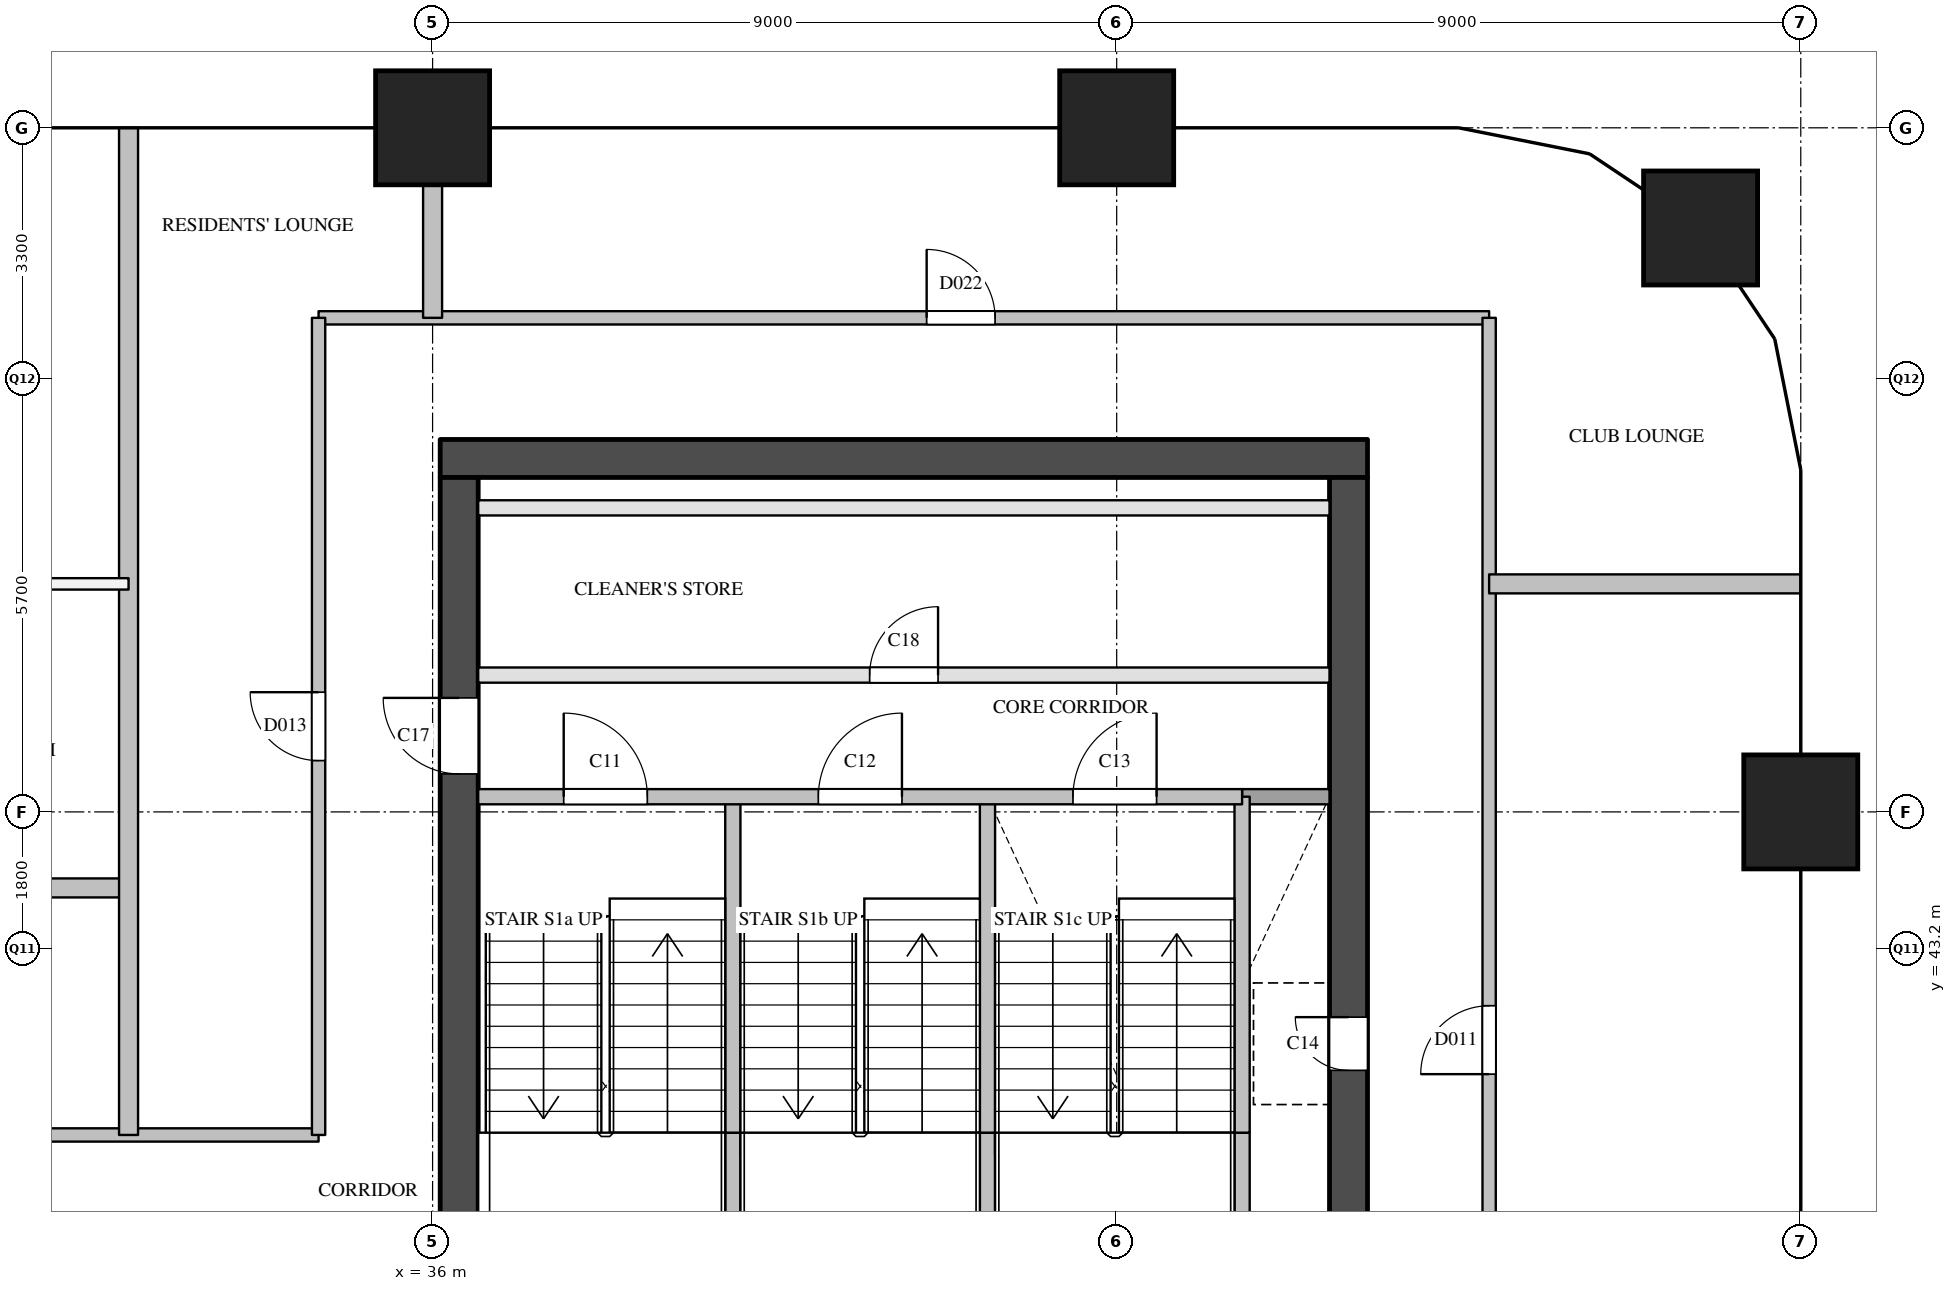
"""IFC4 building model, lengths in metres.
Left out: names, types, materials, properties, quantities, classifications, styles, units other than length and angle.
Written with IfcOpenShell. Run it as: python <this file> out.ifc"""

import sys

from ifc_helpers import new_model, si_unit, direction, frame, frame_2d, origin, origin_2d, place, context, subcontext, project, spatial, rectangle, extrude, element, fill, save


model = new_model("IFC4")
c1 = context("Model", 3, precision=1e-05, world=origin(), true_north=direction((0.0, 1.0)))
c2 = subcontext(c1, "Body", "Model", "MODEL_VIEW")
j1 = project(units=[si_unit("LENGTHUNIT", "METRE"), si_unit("PLANEANGLEUNIT", "RADIAN")], contexts=[c1])
p1 = place(None, origin())
s1 = spatial("IfcSite", under=j1, at=p1, CompositionType="ELEMENT")
p2 = place(p1, origin())
s2 = spatial("IfcBuilding", under=s1, at=p2, CompositionType="ELEMENT")
p3 = place(p2, frame((0.0, 0.0, 173.9)))
s3 = spatial("IfcBuildingStorey", under=s2, at=p3, CompositionType="ELEMENT", Elevation=173.9)
for number, where, z_axis, x_axis in (
    (1, (36.0, 54.0, 0.0), (0.0, 0.0, 1.0), (1.0, 0.0, 0.0)),
    (2, (45.0, 54.0, 0.0), (0.0, 0.0, 1.0), (1.0, 0.0, 0.0)),
    (3, (54.0, 45.0, 0.0), (0.0, 0.0, 1.0), (1.0, 0.0, 0.0)),
    (4, (52.682, 52.682, 0.0), (0.0, 0.0, 1.0), (1.0, 0.0, 0.0)),
):
    element("IfcColumn", number, at=place(p3, frame(where, z_axis=z_axis, x_axis=x_axis)), inside=s3, PredefinedType="COLUMN", context=c2, shape_type="SweptSolid", body=[
        extrude(rectangle(XDim=1.5, YDim=1.5, at=origin_2d()), origin(), (0.0, 0.0, 1.0), 3.9),
    ])
p4 = place(p3, frame((36.1, 49.65, 0.0), z_axis=(0.0, 0.0, 1.0), x_axis=(1.0, 0.0, 0.0)))
e5 = element("IfcWall", 5, at=p4, inside=s3, PredefinedType="SHEAR", context=c2, shape_type="SweptSolid", body=[
    extrude(rectangle(XDim=12.2, YDim=0.5, at=frame_2d((6.1, 0.0))), origin(), (0.0, 0.0, 1.0), 3.6),
])
p5 = place(p3, frame((36.35, 29.1, 0.0), z_axis=(0.0, 0.0, 1.0), x_axis=(0.0, 1.0, 0.0)))
e6 = element("IfcWall", 6, at=p5, inside=s3, PredefinedType="SHEAR", context=c2, shape_type="SweptSolid", body=[
    extrude(rectangle(XDim=20.3, YDim=0.5, at=frame_2d((10.15, 0.0))), origin(), (0.0, 0.0, 1.0), 3.6),
])
p6 = place(p5, frame((3.6, 0.0, 0.0)))
e7 = element("IfcOpeningElement", 7, at=p6, cuts=e6, PredefinedType="OPENING", context=c2, shape_type="SweptSolid", body=[
    extrude(rectangle(XDim=1.8, YDim=2.1, at=frame_2d((0.9, 1.05))), frame((0.0, 0.26, 0.0), z_axis=(0.0, -1.0, 0.0), x_axis=(1.0, 0.0, 0.0)), (0.0, 0.0, 1.0), 0.52),
])
p7 = place(p5, frame((16.4, 0.0, 0.0)))
e8 = element("IfcOpeningElement", 8, at=p7, cuts=e6, PredefinedType="OPENING", context=c2, shape_type="SweptSolid", body=[
    extrude(rectangle(XDim=1.0, YDim=2.1, at=frame_2d((0.5, 1.05))), frame((0.0, 0.26, 0.0), z_axis=(0.0, -1.0, 0.0), x_axis=(1.0, 0.0, 0.0)), (0.0, 0.0, 1.0), 0.52),
])
p8 = place(p3, frame((48.05, 29.1, 0.0), z_axis=(0.0, 0.0, 1.0), x_axis=(0.0, 1.0, 0.0)))
e9 = element("IfcWall", 9, at=p8, inside=s3, PredefinedType="SHEAR", context=c2, shape_type="SweptSolid", body=[
    extrude(rectangle(XDim=20.3, YDim=0.5, at=frame_2d((10.15, 0.0))), origin(), (0.0, 0.0, 1.0), 3.6),
])
p9 = place(p8, frame((12.5, 0.0, 0.0)))
e10 = element("IfcOpeningElement", 10, at=p9, cuts=e9, PredefinedType="OPENING", context=c2, shape_type="SweptSolid", body=[
    extrude(rectangle(XDim=0.7, YDim=2.1, at=frame_2d((0.35, 1.05))), frame((0.0, 0.26, 0.0), z_axis=(0.0, -1.0, 0.0), x_axis=(1.0, 0.0, 0.0)), (0.0, 0.0, 1.0), 0.52),
])
p10 = place(p8, frame((3.9, 0.0, 0.0)))
e11 = element("IfcOpeningElement", 11, at=p10, cuts=e9, PredefinedType="OPENING", context=c2, shape_type="SweptSolid", body=[
    extrude(rectangle(XDim=1.8, YDim=2.1, at=frame_2d((0.9, 1.05))), frame((0.0, 0.26, 0.0), z_axis=(0.0, -1.0, 0.0), x_axis=(1.0, 0.0, 0.0)), (0.0, 0.0, 1.0), 0.52),
])
p11 = place(p3, frame((39.95, 39.0, 0.0), z_axis=(0.0, 0.0, 1.0), x_axis=(0.0, 1.0, 0.0)))
e12 = element("IfcWall", 12, at=p11, inside=s3, PredefinedType="SOLIDWALL", context=c2, shape_type="SweptSolid", body=[
    extrude(rectangle(XDim=1.78, YDim=0.2, at=frame_2d((0.89, 0.0))), origin(), (0.0, 0.0, 1.0), 3.6),
])
p12 = place(p3, frame((39.95, 40.78, 0.0), z_axis=(0.0, 0.0, 1.0), x_axis=(0.0, 1.0, 0.0)))
e13 = element("IfcWall", 13, at=p12, inside=s3, PredefinedType="SOLIDWALL", context=c2, shape_type="SweptSolid", body=[
    extrude(rectangle(XDim=4.42, YDim=0.2, at=frame_2d((2.21, 0.0))), origin(), (0.0, 0.0, 1.0), 3.6),
])
p13 = place(p3, frame((43.3, 39.0, 0.0), z_axis=(0.0, 0.0, 1.0), x_axis=(0.0, 1.0, 0.0)))
e14 = element("IfcWall", 14, at=p13, inside=s3, PredefinedType="SOLIDWALL", context=c2, shape_type="SweptSolid", body=[
    extrude(rectangle(XDim=1.78, YDim=0.2, at=frame_2d((0.89, 0.0))), origin(), (0.0, 0.0, 1.0), 3.6),
])
p14 = place(p3, frame((43.3, 40.78, 0.0), z_axis=(0.0, 0.0, 1.0), x_axis=(0.0, 1.0, 0.0)))
e15 = element("IfcWall", 15, at=p14, inside=s3, PredefinedType="SOLIDWALL", context=c2, shape_type="SweptSolid", body=[
    extrude(rectangle(XDim=4.42, YDim=0.2, at=frame_2d((2.21, 0.0))), origin(), (0.0, 0.0, 1.0), 3.6),
])
p15 = place(p3, frame((46.65, 39.0, 0.0), z_axis=(0.0, 0.0, 1.0), x_axis=(0.0, 1.0, 0.0)))
e16 = element("IfcWall", 16, at=p15, inside=s3, PredefinedType="SOLIDWALL", context=c2, shape_type="SweptSolid", body=[
    extrude(rectangle(XDim=1.78, YDim=0.2, at=frame_2d((0.89, 0.0))), origin(), (0.0, 0.0, 1.0), 3.6),
])
p16 = place(p3, frame((46.65, 40.78, 0.0), z_axis=(0.0, 0.0, 1.0), x_axis=(0.0, 1.0, 0.0)))
e17 = element("IfcWall", 17, at=p16, inside=s3, PredefinedType="SOLIDWALL", context=c2, shape_type="SweptSolid", body=[
    extrude(rectangle(XDim=4.42, YDim=0.2, at=frame_2d((2.21, 0.0))), origin(), (0.0, 0.0, 1.0), 3.6),
])
p17 = place(p3, frame((46.65, 45.2, 0.0), z_axis=(0.0, 0.0, 1.0), x_axis=(1.0, 0.0, 0.0)))
e18 = element("IfcWall", 18, at=p17, inside=s3, PredefinedType="SOLIDWALL", context=c2, shape_type="SweptSolid", body=[
    extrude(rectangle(XDim=1.15, YDim=0.2, at=frame_2d((0.575, 0.0))), origin(), (0.0, 0.0, 1.0), 3.6),
])
p18 = place(p3, frame((36.6, 45.2, 0.0), z_axis=(0.0, 0.0, 1.0), x_axis=(1.0, 0.0, 0.0)))
e19 = element("IfcWall", 19, at=p18, inside=s3, PredefinedType="SOLIDWALL", context=c2, shape_type="SweptSolid", body=[
    extrude(rectangle(XDim=10.05, YDim=0.2, at=frame_2d((5.025, 0.0))), origin(), (0.0, 0.0, 1.0), 3.6),
])
p19 = place(p18, frame((1.125, 0.0, 0.0)))
e20 = element("IfcOpeningElement", 20, at=p19, cuts=e19, PredefinedType="OPENING", context=c2, shape_type="SweptSolid", body=[
    extrude(rectangle(XDim=1.1, YDim=2.1, at=frame_2d((0.55, 1.05))), frame((0.0, 0.11, 0.0), z_axis=(0.0, -1.0, 0.0), x_axis=(1.0, 0.0, 0.0)), (0.0, 0.0, 1.0), 0.22),
])
p20 = place(p18, frame((4.475, 0.0, 0.0)))
e21 = element("IfcOpeningElement", 21, at=p20, cuts=e19, PredefinedType="OPENING", context=c2, shape_type="SweptSolid", body=[
    extrude(rectangle(XDim=1.1, YDim=2.1, at=frame_2d((0.55, 1.05))), frame((0.0, 0.11, 0.0), z_axis=(0.0, -1.0, 0.0), x_axis=(1.0, 0.0, 0.0)), (0.0, 0.0, 1.0), 0.22),
])
p21 = place(p18, frame((7.825, 0.0, 0.0)))
e22 = element("IfcOpeningElement", 22, at=p21, cuts=e19, PredefinedType="OPENING", context=c2, shape_type="SweptSolid", body=[
    extrude(rectangle(XDim=1.1, YDim=2.1, at=frame_2d((0.55, 1.05))), frame((0.0, 0.11, 0.0), z_axis=(0.0, -1.0, 0.0), x_axis=(1.0, 0.0, 0.0)), (0.0, 0.0, 1.0), 0.22),
])
p22 = place(p3, frame((36.6, 46.8, 0.0), z_axis=(0.0, 0.0, 1.0), x_axis=(1.0, 0.0, 0.0)))
e23 = element("IfcWall", 23, at=p22, inside=s3, PredefinedType="PARTITIONING", context=c2, shape_type="SweptSolid", body=[
    extrude(rectangle(XDim=11.2, YDim=0.2, at=frame_2d((5.6, 0.0))), origin(), (0.0, 0.0, 1.0), 3.6),
])
p23 = place(p22, frame((5.15, 0.0, 0.0)))
e24 = element("IfcOpeningElement", 24, at=p23, cuts=e23, PredefinedType="OPENING", context=c2, shape_type="SweptSolid", body=[
    extrude(rectangle(XDim=0.9, YDim=2.1, at=frame_2d((0.45, 1.05))), frame((0.0, 0.11, 0.0), z_axis=(0.0, -1.0, 0.0), x_axis=(1.0, 0.0, 0.0)), (0.0, 0.0, 1.0), 0.22),
])
p24 = place(p3, frame((36.6, 49.0, 0.0), z_axis=(0.0, 0.0, 1.0), x_axis=(1.0, 0.0, 0.0)))
e25 = element("IfcWall", 25, at=p24, inside=s3, PredefinedType="PARTITIONING", context=c2, shape_type="SweptSolid", body=[
    extrude(rectangle(XDim=11.2, YDim=0.2, at=frame_2d((5.6, 0.0))), origin(), (0.0, 0.0, 1.0), 3.6),
])
p25 = place(p3, frame((19.5, 40.75, 0.0), z_axis=(0.0, 0.0, 1.0), x_axis=(1.0, 0.0, 0.0)))
e26 = element("IfcWall", 26, at=p25, inside=s3, PredefinedType="PARTITIONING", context=c2, shape_type="SweptSolid", body=[
    extrude(rectangle(XDim=15.0, YDim=0.175, at=frame_2d((7.5, 0.0))), origin(), (0.0, 0.0, 1.0), 2.6),
])
p26 = place(p25, frame((5.75, 0.0, 0.0)))
e27 = element("IfcOpeningElement", 27, at=p26, cuts=e26, PredefinedType="OPENING", context=c2, shape_type="SweptSolid", body=[
    extrude(rectangle(XDim=1.0, YDim=2.1, at=frame_2d((0.5, 1.05))), frame((0.0, 0.097, 0.0), z_axis=(0.0, -1.0, 0.0), x_axis=(1.0, 0.0, 0.0)), (0.0, 0.0, 1.0), 0.195),
])
p27 = place(p3, frame((34.5, 51.5, 0.0), z_axis=(0.0, 0.0, 1.0), x_axis=(1.0, 0.0, 0.0)))
e28 = element("IfcWall", 28, at=p27, inside=s3, PredefinedType="PARTITIONING", context=c2, shape_type="SweptSolid", body=[
    extrude(rectangle(XDim=15.4, YDim=0.175, at=frame_2d((7.7, 0.0))), origin(), (0.0, 0.0, 1.0), 3.6),
])
p28 = place(p27, frame((8.0, 0.0, 0.0)))
e29 = element("IfcOpeningElement", 29, at=p28, cuts=e28, PredefinedType="OPENING", context=c2, shape_type="SweptSolid", body=[
    extrude(rectangle(XDim=0.9, YDim=2.1, at=frame_2d((0.45, 1.05))), frame((0.0, 0.097, 0.0), z_axis=(0.0, -1.0, 0.0), x_axis=(1.0, 0.0, 0.0)), (0.0, 0.0, 1.0), 0.195),
])
p29 = place(p3, frame((34.5, 40.75, 0.0), z_axis=(0.0, 0.0, 1.0), x_axis=(0.0, 1.0, 0.0)))
e30 = element("IfcWall", 30, at=p29, inside=s3, PredefinedType="PARTITIONING", context=c2, shape_type="SweptSolid", body=[
    extrude(rectangle(XDim=10.75, YDim=0.175, at=frame_2d((5.375, 0.0))), origin(), (0.0, 0.0, 1.0), 3.6),
])
p30 = place(p29, frame((4.925, 0.0, 0.0)))
e31 = element("IfcOpeningElement", 31, at=p30, cuts=e30, PredefinedType="OPENING", context=c2, shape_type="SweptSolid", body=[
    extrude(rectangle(XDim=0.9, YDim=2.1, at=frame_2d((0.45, 1.05))), frame((0.0, 0.097, 0.0), z_axis=(0.0, -1.0, 0.0), x_axis=(1.0, 0.0, 0.0)), (0.0, 0.0, 1.0), 0.195),
])
p31 = place(p3, frame((49.9, 28.5, 0.0), z_axis=(0.0, 0.0, 1.0), x_axis=(0.0, 1.0, 0.0)))
e32 = element("IfcWall", 32, at=p31, inside=s3, PredefinedType="PARTITIONING", context=c2, shape_type="SweptSolid", body=[
    extrude(rectangle(XDim=23.0, YDim=0.175, at=frame_2d((11.5, 0.0))), origin(), (0.0, 0.0, 1.0), 3.6),
])
p32 = place(p31, frame((3.3, 0.0, 0.0)))
e33 = element("IfcOpeningElement", 33, at=p32, cuts=e32, PredefinedType="OPENING", context=c2, shape_type="SweptSolid", body=[
    extrude(rectangle(XDim=0.9, YDim=2.1, at=frame_2d((0.45, 1.05))), frame((0.0, 0.097, 0.0), z_axis=(0.0, -1.0, 0.0), x_axis=(1.0, 0.0, 0.0)), (0.0, 0.0, 1.0), 0.195),
])
p33 = place(p31, frame((13.05, 0.0, 0.0)))
e34 = element("IfcOpeningElement", 34, at=p33, cuts=e32, PredefinedType="OPENING", context=c2, shape_type="SweptSolid", body=[
    extrude(rectangle(XDim=0.9, YDim=2.1, at=frame_2d((0.45, 1.05))), frame((0.0, 0.097, 0.0), z_axis=(0.0, -1.0, 0.0), x_axis=(1.0, 0.0, 0.0)), (0.0, 0.0, 1.0), 0.195),
])
p34 = place(p3, frame((21.184, 48.0, 0.0), z_axis=(0.0, 0.0, 1.0), x_axis=(1.0, 0.0, 0.0)))
e35 = element("IfcWall", 35, at=p34, inside=s3, PredefinedType="PARTITIONING", context=c2, shape_type="SweptSolid", body=[
    extrude(rectangle(XDim=10.816, YDim=0.15, at=frame_2d((5.408, 0.0))), origin(), (0.0, 0.0, 1.0), 2.6),
])
p35 = place(p34, frame((2.416, 0.0, 0.0)))
e36 = element("IfcOpeningElement", 36, at=p35, cuts=e35, PredefinedType="OPENING", context=c2, shape_type="SweptSolid", body=[
    extrude(rectangle(XDim=0.9, YDim=2.1, at=frame_2d((0.45, 1.05))), frame((0.0, 0.085, 0.0), z_axis=(0.0, -1.0, 0.0), x_axis=(1.0, 0.0, 0.0)), (0.0, 0.0, 1.0), 0.17),
])
p36 = place(p34, frame((7.824, 0.0, 0.0)))
e37 = element("IfcOpeningElement", 37, at=p36, cuts=e35, PredefinedType="OPENING", context=c2, shape_type="SweptSolid", body=[
    extrude(rectangle(XDim=0.9, YDim=2.1, at=frame_2d((0.45, 1.05))), frame((0.0, 0.085, 0.0), z_axis=(0.0, -1.0, 0.0), x_axis=(1.0, 0.0, 0.0)), (0.0, 0.0, 1.0), 0.17),
])
p37 = place(p3, frame((19.5, 44.0, 0.0), z_axis=(0.0, 0.0, 1.0), x_axis=(1.0, 0.0, 0.0)))
e38 = element("IfcWall", 38, at=p37, inside=s3, PredefinedType="PARTITIONING", context=c2, shape_type="SweptSolid", body=[
    extrude(rectangle(XDim=12.5, YDim=0.25, at=frame_2d((6.25, 0.0))), origin(), (0.0, 0.0, 1.0), 2.6),
])
p38 = place(p3, frame((49.9, 48.0, 0.0), z_axis=(0.0, 0.0, 1.0), x_axis=(1.0, 0.0, 0.0)))
e39 = element("IfcWall", 39, at=p38, inside=s3, PredefinedType="PARTITIONING", context=c2, shape_type="SweptSolid", body=[
    extrude(rectangle(XDim=4.1, YDim=0.25, at=frame_2d((2.05, 0.0))), origin(), (0.0, 0.0, 1.0), 2.6),
])
p39 = place(p3, frame((32.0, 40.75, 0.0), z_axis=(0.0, 0.0, 1.0), x_axis=(0.0, 1.0, 0.0)))
e40 = element("IfcWall", 40, at=p39, inside=s3, PredefinedType="PARTITIONING", context=c2, shape_type="SweptSolid", body=[
    extrude(rectangle(XDim=13.25, YDim=0.25, at=frame_2d((6.625, 0.0))), origin(), (0.0, 0.0, 1.0), 2.6),
])
p40 = place(p3, frame((36.0, 51.5, 0.0), z_axis=(0.0, 0.0, 1.0), x_axis=(0.0, 1.0, 0.0)))
e41 = element("IfcWall", 41, at=p40, inside=s3, PredefinedType="PARTITIONING", context=c2, shape_type="SweptSolid", body=[
    extrude(rectangle(XDim=2.5, YDim=0.25, at=frame_2d((1.25, 0.0))), origin(), (0.0, 0.0, 1.0), 3.6),
])
p41 = place(p19, origin())
e42 = element("IfcDoor", 42, at=p41, inside=s3, OperationType="SINGLE_SWING_LEFT", PredefinedType="DOOR", context=c2, shape_type="SweptSolid", body=[
    extrude(rectangle(XDim=1.1, YDim=2.1, at=frame_2d((0.55, 1.05))), frame((0.0, 0.025, 0.0), z_axis=(0.0, -1.0, 0.0), x_axis=(1.0, 0.0, 0.0)), (0.0, 0.0, 1.0), 0.05),
])
fill(e20, e42)
p42 = place(p20, origin())
e43 = element("IfcDoor", 43, at=p42, inside=s3, OperationType="SINGLE_SWING_RIGHT", PredefinedType="DOOR", context=c2, shape_type="SweptSolid", body=[
    extrude(rectangle(XDim=1.1, YDim=2.1, at=frame_2d((0.55, 1.05))), frame((0.0, 0.025, 0.0), z_axis=(0.0, -1.0, 0.0), x_axis=(1.0, 0.0, 0.0)), (0.0, 0.0, 1.0), 0.05),
])
fill(e21, e43)
p43 = place(p21, origin())
e44 = element("IfcDoor", 44, at=p43, inside=s3, OperationType="SINGLE_SWING_RIGHT", PredefinedType="DOOR", context=c2, shape_type="SweptSolid", body=[
    extrude(rectangle(XDim=1.1, YDim=2.1, at=frame_2d((0.55, 1.05))), frame((0.0, 0.025, 0.0), z_axis=(0.0, -1.0, 0.0), x_axis=(1.0, 0.0, 0.0)), (0.0, 0.0, 1.0), 0.05),
])
fill(e22, e44)
p44 = place(p9, origin())
e45 = element("IfcDoor", 45, at=p44, inside=s3, OperationType="SINGLE_SWING_RIGHT", PredefinedType="DOOR", context=c2, shape_type="SweptSolid", body=[
    extrude(rectangle(XDim=0.7, YDim=2.1, at=frame_2d((0.35, 1.05))), frame((0.0, 0.025, 0.0), z_axis=(0.0, -1.0, 0.0), x_axis=(1.0, 0.0, 0.0)), (0.0, 0.0, 1.0), 0.05),
])
fill(e10, e45)
p45 = place(p7, origin())
e46 = element("IfcDoor", 46, at=p45, inside=s3, OperationType="SINGLE_SWING_RIGHT", PredefinedType="DOOR", context=c2, shape_type="SweptSolid", body=[
    extrude(rectangle(XDim=1.0, YDim=2.1, at=frame_2d((0.5, 1.05))), frame((0.0, 0.025, 0.0), z_axis=(0.0, -1.0, 0.0), x_axis=(1.0, 0.0, 0.0)), (0.0, 0.0, 1.0), 0.05),
])
fill(e8, e46)
p46 = place(p23, origin())
e47 = element("IfcDoor", 47, at=p46, inside=s3, OperationType="SINGLE_SWING_RIGHT", PredefinedType="DOOR", context=c2, shape_type="SweptSolid", body=[
    extrude(rectangle(XDim=0.9, YDim=2.1, at=frame_2d((0.45, 1.05))), frame((0.0, 0.025, 0.0), z_axis=(0.0, -1.0, 0.0), x_axis=(1.0, 0.0, 0.0)), (0.0, 0.0, 1.0), 0.05),
])
fill(e24, e47)
p47 = place(p33, origin())
e48 = element("IfcDoor", 48, at=p47, inside=s3, OperationType="SINGLE_SWING_LEFT", PredefinedType="DOOR", context=c2, shape_type="SweptSolid", body=[
    extrude(rectangle(XDim=0.9, YDim=2.1, at=frame_2d((0.45, 1.05))), frame((0.0, 0.025, 0.0), z_axis=(0.0, -1.0, 0.0), x_axis=(1.0, 0.0, 0.0)), (0.0, 0.0, 1.0), 0.05),
])
fill(e34, e48)
p48 = place(p30, origin())
e49 = element("IfcDoor", 49, at=p48, inside=s3, OperationType="SINGLE_SWING_RIGHT", PredefinedType="DOOR", context=c2, shape_type="SweptSolid", body=[
    extrude(rectangle(XDim=0.9, YDim=2.1, at=frame_2d((0.45, 1.05))), frame((0.0, 0.025, 0.0), z_axis=(0.0, -1.0, 0.0), x_axis=(1.0, 0.0, 0.0)), (0.0, 0.0, 1.0), 0.05),
])
fill(e31, e49)
p49 = place(p28, origin())
e50 = element("IfcDoor", 50, at=p49, inside=s3, OperationType="SINGLE_SWING_LEFT", PredefinedType="DOOR", context=c2, shape_type="SweptSolid", body=[
    extrude(rectangle(XDim=0.9, YDim=2.1, at=frame_2d((0.45, 1.05))), frame((0.0, 0.025, 0.0), z_axis=(0.0, -1.0, 0.0), x_axis=(1.0, 0.0, 0.0)), (0.0, 0.0, 1.0), 0.05),
])
fill(e29, e50)
save(model, sys.argv[1])
